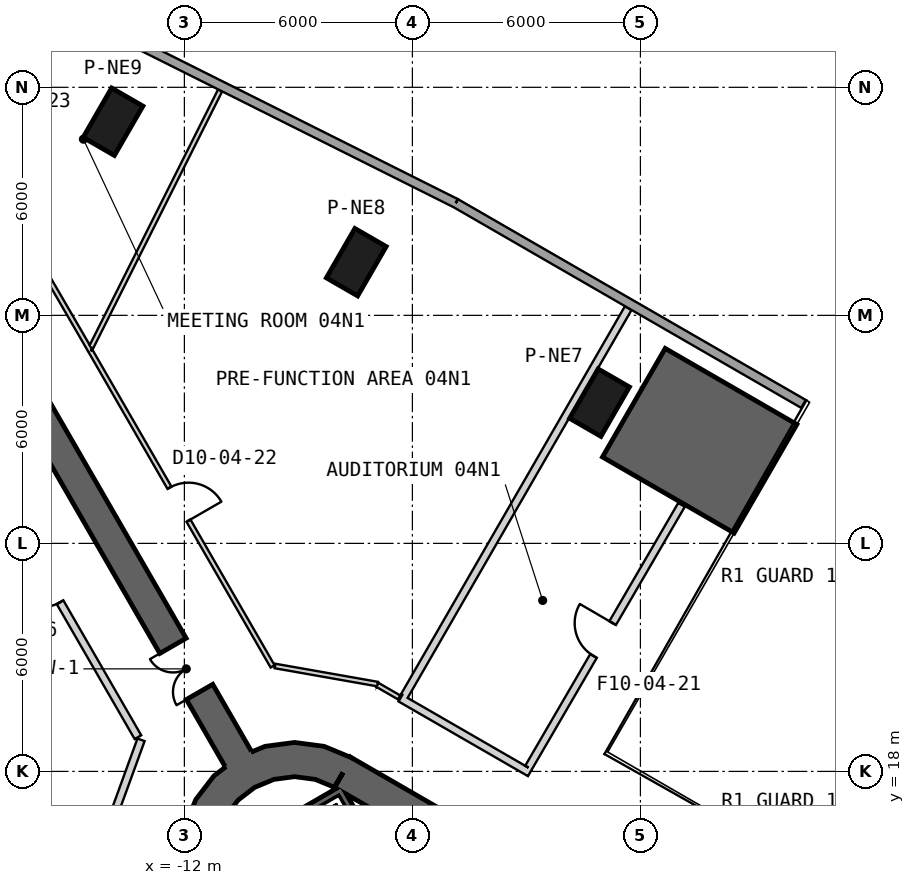
"""IFC4 building model, lengths in metres.
Left out: names, types, materials, properties, quantities, classifications, styles, units other than length and angle.
Written with IfcOpenShell. Run it as: python <this file> out.ifc"""

import sys

from ifc_helpers import new_model, si_unit, direction, frame, frame_2d, origin, origin_2d, place, context, subcontext, project, spatial, polyline, rectangle, outline, extrude, element, fill, save


model = new_model("IFC4")
c1 = context("Model", 3, precision=1e-05, world=origin(), true_north=direction((0.0, 1.0)))
c2 = subcontext(c1, "Body", "Model", "MODEL_VIEW")
j1 = project(units=[si_unit("LENGTHUNIT", "METRE"), si_unit("PLANEANGLEUNIT", "RADIAN")], contexts=[c1])
p1 = place(None, origin())
s1 = spatial("IfcSite", under=j1, at=p1, CompositionType="ELEMENT")
p2 = place(p1, origin())
s2 = spatial("IfcBuilding", under=s1, at=p2, CompositionType="ELEMENT")
p3 = place(p2, frame((0.0, 0.0, 27.5)))
s3 = spatial("IfcBuildingStorey", under=s2, at=p3, CompositionType="ELEMENT", Elevation=27.5)
for number, where, z_axis, x_axis in (
    (1, (-1.076, 27.703, 0.0), (0.0, 0.0, 1.0), (0.5, 0.866, 0.0)),
    (2, (-7.477, 31.398, 0.0), (0.0, 0.0, 1.0), (0.5, 0.866, 0.0)),
    (3, (-13.878, 35.094, 0.0), (0.0, 0.0, 1.0), (0.5, 0.866, 0.0)),
):
    element("IfcColumn", number, at=place(p3, frame(where, z_axis=z_axis, x_axis=x_axis)), inside=s3, PredefinedType="COLUMN", context=c2, shape_type="SweptSolid", body=[
        extrude(rectangle(XDim=1.5, YDim=0.95, at=origin_2d()), origin(), (0.0, 0.0, 1.0), 6.0),
    ])
p4 = place(p3, frame((19.475, 2.208, 0.0), z_axis=(0.0, 0.0, 1.0), x_axis=(-0.866028369851, 0.499994862586, 0.0)))
e4 = element("IfcWall", 4, at=p4, inside=s3, PredefinedType="SHEAR", context=c2, shape_type="SweptSolid", body=[
    extrude(rectangle(XDim=31.523, YDim=0.9, at=frame_2d((15.762, 0.0))), origin(), (0.0, 0.0, 1.0), 6.0),
])
p5 = place(p4, frame((7.062, 0.0, 0.0)))
e5 = element("IfcOpeningElement", 5, at=p5, cuts=e4, PredefinedType="OPENING", context=c2, shape_type="SweptSolid", body=[
    extrude(rectangle(XDim=1.2, YDim=2.4, at=frame_2d((0.6, 1.2))), frame((0.0, 0.46, 0.0), z_axis=(0.0, -1.0, 0.0), x_axis=(1.0, 0.0, 0.0)), (0.0, 0.0, 1.0), 0.92),
])
p6 = place(p4, frame((9.762, 0.0, 0.0)))
e6 = element("IfcOpeningElement", 6, at=p6, cuts=e4, PredefinedType="OPENING", context=c2, shape_type="SweptSolid", body=[
    extrude(rectangle(XDim=1.2, YDim=2.4, at=frame_2d((0.6, 1.2))), frame((0.0, 0.46, 0.0), z_axis=(0.0, -1.0, 0.0), x_axis=(1.0, 0.0, 0.0)), (0.0, 0.0, 1.0), 0.92),
])
p7 = place(p4, frame((12.462, 0.0, 0.0)))
e7 = element("IfcOpeningElement", 7, at=p7, cuts=e4, PredefinedType="OPENING", context=c2, shape_type="SweptSolid", body=[
    extrude(rectangle(XDim=1.2, YDim=2.4, at=frame_2d((0.6, 1.2))), frame((0.0, 0.46, 0.0), z_axis=(0.0, -1.0, 0.0), x_axis=(1.0, 0.0, 0.0)), (0.0, 0.0, 1.0), 0.92),
])
p8 = place(p4, frame((15.162, 0.0, 0.0)))
e8 = element("IfcOpeningElement", 8, at=p8, cuts=e4, PredefinedType="OPENING", context=c2, shape_type="SweptSolid", body=[
    extrude(rectangle(XDim=1.2, YDim=2.4, at=frame_2d((0.6, 1.2))), frame((0.0, 0.46, 0.0), z_axis=(0.0, -1.0, 0.0), x_axis=(1.0, 0.0, 0.0)), (0.0, 0.0, 1.0), 0.92),
])
p9 = place(p4, frame((17.862, 0.0, 0.0)))
e9 = element("IfcOpeningElement", 9, at=p9, cuts=e4, PredefinedType="OPENING", context=c2, shape_type="SweptSolid", body=[
    extrude(rectangle(XDim=1.2, YDim=2.4, at=frame_2d((0.6, 1.2))), frame((0.0, 0.46, 0.0), z_axis=(0.0, -1.0, 0.0), x_axis=(1.0, 0.0, 0.0)), (0.0, 0.0, 1.0), 0.92),
])
p10 = place(p4, frame((20.562, 0.0, 0.0)))
e10 = element("IfcOpeningElement", 10, at=p10, cuts=e4, PredefinedType="OPENING", context=c2, shape_type="SweptSolid", body=[
    extrude(rectangle(XDim=1.2, YDim=2.4, at=frame_2d((0.6, 1.2))), frame((0.0, 0.46, 0.0), z_axis=(0.0, -1.0, 0.0), x_axis=(1.0, 0.0, 0.0)), (0.0, 0.0, 1.0), 0.92),
])
p11 = place(p4, frame((23.262, 0.0, 0.0)))
e11 = element("IfcOpeningElement", 11, at=p11, cuts=e4, PredefinedType="OPENING", context=c2, shape_type="SweptSolid", body=[
    extrude(rectangle(XDim=1.2, YDim=2.4, at=frame_2d((0.6, 1.2))), frame((0.0, 0.46, 0.0), z_axis=(0.0, -1.0, 0.0), x_axis=(1.0, 0.0, 0.0)), (0.0, 0.0, 1.0), 0.92),
])
p12 = place(p4, frame((3.612, 0.0, 0.0)))
e12 = element("IfcOpeningElement", 12, at=p12, cuts=e4, PredefinedType="OPENING", context=c2, shape_type="SweptSolid", body=[
    extrude(rectangle(XDim=1.2, YDim=2.4, at=frame_2d((0.6, 1.2))), frame((0.0, 0.46, 0.0), z_axis=(0.0, -1.0, 0.0), x_axis=(1.0, 0.0, 0.0)), (0.0, 0.0, 1.0), 0.92),
])
p13 = place(p4, frame((26.712, 0.0, 0.0)))
e13 = element("IfcOpeningElement", 13, at=p13, cuts=e4, PredefinedType="OPENING", context=c2, shape_type="SweptSolid", body=[
    extrude(rectangle(XDim=1.2, YDim=2.4, at=frame_2d((0.6, 1.2))), frame((0.0, 0.46, 0.0), z_axis=(0.0, -1.0, 0.0), x_axis=(1.0, 0.0, 0.0)), (0.0, 0.0, 1.0), 0.92),
])
p14 = place(p3, origin())
e14 = element("IfcWall", 14, at=p14, inside=s3, PredefinedType="SHEAR", context=c2, shape_type="SweptSolid", body=[
    extrude(outline(polyline([(-7.6, 18.36), (-8.323, 18.659), (-9.1, 18.762), (-9.876, 18.659), (-10.6, 18.36), (-11.221, 17.883), (-11.698, 17.262), (-11.998, 16.538), (-12.1, 15.762), (-11.2, 15.762), (-11.128, 16.305), (-10.919, 16.812), (-10.585, 17.247), (-10.15, 17.58), (-9.644, 17.79), (-9.1, 17.862), (-8.556, 17.79), (-8.05, 17.58), (-7.6, 18.36)])), origin(), (0.0, 0.0, 1.0), 6.0),
])
p15 = place(p3, frame((-10.575, 18.316, 0.0), z_axis=(0.0, 0.0, 1.0), x_axis=(-0.499996575515, 0.866027380903, 0.0)))
e15 = element("IfcWall", 15, at=p15, inside=s3, PredefinedType="SHEAR", context=c2, shape_type="SweptSolid", body=[
    extrude(rectangle(XDim=13.954, YDim=0.8, at=frame_2d((6.977, 0.0))), origin(), (0.0, 0.0, 1.0), 6.0),
])
p16 = place(p15, frame((2.05, 0.0, 0.0)))
e16 = element("IfcOpeningElement", 16, at=p16, cuts=e15, PredefinedType="OPENING", context=c2, shape_type="SweptSolid", body=[
    extrude(rectangle(XDim=1.4, YDim=2.4, at=frame_2d((0.7, 1.2))), frame((0.0, 0.41, 0.0), z_axis=(0.0, -1.0, 0.0), x_axis=(1.0, 0.0, 0.0)), (0.0, 0.0, 1.0), 0.82),
])
p17 = place(p3, origin())
e17 = element("IfcWall", 17, at=p17, inside=s3, PredefinedType="SHEAR", context=c2, shape_type="SweptSolid", body=[
    extrude(outline(polyline([(4.116, 27.13), (0.652, 29.13), (-0.998, 26.272), (2.467, 24.272), (4.116, 27.13)])), origin(), (0.0, 0.0, 1.0), 6.0),
])
p18 = place(p3, frame((4.29, 27.67, 0.0), z_axis=(0.0, 0.0, 1.0), x_axis=(-0.866062075984, 0.499936476508, 0.0)))
e18 = element("IfcWall", 18, at=p18, inside=s3, PredefinedType="SOLIDWALL", context=c2, shape_type="SweptSolid", body=[
    extrude(rectangle(XDim=10.566, YDim=0.24, at=frame_2d((5.283, 0.0))), origin(), (0.0, 0.0, 1.0), 5.7),
])
p19 = place(p3, frame((-4.861, 32.952, 0.0), z_axis=(0.0, 0.0, 1.0), x_axis=(-0.894285628533, 0.447496608478, 0.0)))
e19 = element("IfcWall", 19, at=p19, inside=s3, PredefinedType="SOLIDWALL", context=c2, shape_type="SweptSolid", body=[
    extrude(rectangle(XDim=13.801, YDim=0.24, at=frame_2d((6.901, 0.0))), origin(), (0.0, 0.0, 1.0), 5.7),
])
p20 = place(p3, frame((-7.818, 17.541, -0.3), z_axis=(0.0, 0.0, 1.0), x_axis=(-0.866088799389, -0.499890179513, 0.0)))
e20 = element("IfcWall", 20, at=p20, inside=s3, PredefinedType="SHEAR", context=c2, shape_type="SweptSolid", body=[
    extrude(rectangle(XDim=1.89, YDim=0.2, at=frame_2d((0.945, 0.0))), origin(), (0.0, 0.0, 1.0), 6.0),
])
p21 = place(p3, frame((-7.854, 17.405, -0.3), z_axis=(0.0, 0.0, 1.0), x_axis=(0.499997992926, -0.866026562566, 0.0)))
e21 = element("IfcWall", 21, at=p21, inside=s3, PredefinedType="SHEAR", context=c2, shape_type="SweptSolid", body=[
    extrude(rectangle(XDim=7.9, YDim=0.2, at=frame_2d((3.95, 0.0))), origin(), (0.0, 0.0, 1.0), 6.0),
])
p22 = place(p3, frame((-13.14, 18.831, 0.0), z_axis=(0.0, 0.0, 1.0), x_axis=(-0.34195308529, -0.939717025205, 0.0)))
e22 = element("IfcWall", 22, at=p22, inside=s3, PredefinedType="PARTITIONING", context=c2, shape_type="SweptSolid", body=[
    extrude(rectangle(XDim=2.707, YDim=0.2, at=frame_2d((1.353, 0.0))), origin(), (0.0, 0.0, 1.0), 4.78),
])
p23 = place(p3, frame((-13.222, 18.9, 0.0), z_axis=(0.0, 0.0, 1.0), x_axis=(-0.499993569446, 0.866029116435, 0.0)))
e23 = element("IfcWall", 23, at=p23, inside=s3, PredefinedType="PARTITIONING", context=c2, shape_type="SweptSolid", body=[
    extrude(rectangle(XDim=9.51, YDim=0.2, at=frame_2d((4.755, 0.0))), origin(), (0.0, 0.0, 1.0), 5.7),
])
p24 = place(p23, frame((4.1, 0.0, 0.0)))
e24 = element("IfcOpeningElement", 24, at=p24, cuts=e23, PredefinedType="OPENING", context=c2, shape_type="SweptSolid", body=[
    extrude(rectangle(XDim=1.0, YDim=2.1, at=frame_2d((0.5, 1.05))), frame((0.0, 0.11, 0.0), z_axis=(0.0, -1.0, 0.0), x_axis=(1.0, 0.0, 0.0)), (0.0, 0.0, 1.0), 0.22),
])
p25 = place(p3, frame((-2.909, 17.962, 0.0), z_axis=(0.0, 0.0, 1.0), x_axis=(-0.866156637233, 0.499772628079, 0.0)))
e25 = element("IfcWall", 25, at=p25, inside=s3, PredefinedType="PARTITIONING", context=c2, shape_type="SweptSolid", body=[
    extrude(rectangle(XDim=3.931, YDim=0.2, at=frame_2d((1.966, 0.0))), origin(), (0.0, 0.0, 1.0), 4.88),
])
p26 = place(p3, frame((-2.945, 18.098, 0.0), z_axis=(0.0, 0.0, 1.0), x_axis=(0.503235430028, 0.864149351654, 0.0)))
e26 = element("IfcWall", 26, at=p26, inside=s3, PredefinedType="PARTITIONING", context=c2, shape_type="SweptSolid", body=[
    extrude(rectangle(XDim=8.002, YDim=0.2, at=frame_2d((4.001, 0.0))), origin(), (0.0, 0.0, 1.0), 5.17),
])
p27 = place(p26, frame((3.402, 0.0, 0.0)))
e27 = element("IfcOpeningElement", 27, at=p27, cuts=e26, PredefinedType="OPENING", context=c2, shape_type="SweptSolid", body=[
    extrude(rectangle(XDim=1.0, YDim=2.1, at=frame_2d((0.5, 1.05))), frame((0.0, 0.11, 0.0), z_axis=(0.0, -1.0, 0.0), x_axis=(1.0, 0.0, 0.0)), (0.0, 0.0, 1.0), 0.22),
])
p28 = place(p3, frame((-14.474, 29.069, 0.0), z_axis=(0.0, 0.0, 1.0), x_axis=(0.500007429105, -0.866021114546, 0.0)))
e28 = element("IfcWall", 28, at=p28, inside=s3, PredefinedType="PARTITIONING", context=c2, shape_type="SweptSolid", body=[
    extrude(rectangle(XDim=9.591, YDim=0.12, at=frame_2d((4.795, 0.0))), origin(), (0.0, 0.0, 1.0), 5.7),
])
p29 = place(p28, frame((4.164, 0.0, 0.0)))
e29 = element("IfcOpeningElement", 29, at=p29, cuts=e28, PredefinedType="OPENING", context=c2, shape_type="SweptSolid", body=[
    extrude(rectangle(XDim=1.0, YDim=2.1, at=frame_2d((0.5, 1.05))), frame((0.0, 0.07, 0.0), z_axis=(0.0, -1.0, 0.0), x_axis=(1.0, 0.0, 0.0)), (0.0, 0.0, 1.0), 0.14),
])
p30 = place(p3, frame((-6.915, 20.297, 0.0), z_axis=(0.0, 0.0, 1.0), x_axis=(-0.98477728301, 0.173820893068, 0.0)))
e30 = element("IfcWall", 30, at=p30, inside=s3, PredefinedType="PARTITIONING", context=c2, shape_type="SweptSolid", body=[
    extrude(rectangle(XDim=2.742, YDim=0.12, at=frame_2d((1.371, 0.0))), origin(), (0.0, 0.0, 1.0), 4.78),
])
p31 = place(p3, frame((-6.349, 19.947, 0.0), z_axis=(0.0, 0.0, 1.0), x_axis=(-0.865964461276, 0.500105540669, 0.0)))
e31 = element("IfcWall", 31, at=p31, inside=s3, PredefinedType="PARTITIONING", context=c2, shape_type="SweptSolid", body=[
    extrude(rectangle(XDim=0.662, YDim=0.12, at=frame_2d((0.331, 0.0))), origin(), (0.0, 0.0, 1.0), 5.7),
])
p32 = place(p3, frame((-20.466, 39.392, 0.0), z_axis=(0.0, 0.0, 1.0), x_axis=(0.50207038067, -0.86482676465, 0.0)))
e32 = element("IfcWall", 32, at=p32, inside=s3, PredefinedType="PARTITIONING", context=c2, shape_type="SweptSolid", body=[
    extrude(rectangle(XDim=11.936, YDim=0.12, at=frame_2d((5.968, 0.0))), origin(), (0.0, 0.0, 1.0), 5.7),
])
p33 = place(p32, frame((5.267, 0.0, 0.0)))
e33 = element("IfcOpeningElement", 33, at=p33, cuts=e32, PredefinedType="OPENING", context=c2, shape_type="SweptSolid", body=[
    extrude(rectangle(XDim=1.0, YDim=2.1, at=frame_2d((0.5, 1.05))), frame((0.0, 0.07, 0.0), z_axis=(0.0, -1.0, 0.0), x_axis=(1.0, 0.0, 0.0)), (0.0, 0.0, 1.0), 0.14),
])
p34 = place(p3, frame((-6.212, 19.983, 0.0), z_axis=(0.0, 0.0, 1.0), x_axis=(0.499938894435, 0.866060680225, 0.0)))
e34 = element("IfcWall", 34, at=p34, inside=s3, PredefinedType="PARTITIONING", context=c2, shape_type="SweptSolid", body=[
    extrude(rectangle(XDim=11.782, YDim=0.2, at=frame_2d((5.891, 0.0))), origin(), (0.0, 0.0, 1.0), 4.88),
])
p35 = place(p3, frame((-11.061, 35.915, 0.0), z_axis=(0.0, 0.0, 1.0), x_axis=(-0.448736604458, -0.893664064299, 0.0)))
e35 = element("IfcWall", 35, at=p35, inside=s3, PredefinedType="PARTITIONING", context=c2, shape_type="SweptSolid", body=[
    extrude(rectangle(XDim=7.563, YDim=0.12, at=frame_2d((3.781, 0.0))), origin(), (0.0, 0.0, 1.0), 4.78),
])
p36 = place(p24, origin())
e36 = element("IfcDoor", 36, at=p36, inside=s3, OperationType="SINGLE_SWING_RIGHT", PredefinedType="USERDEFINED", context=c2, shape_type="SweptSolid", body=[
    extrude(rectangle(XDim=1.0, YDim=2.1, at=frame_2d((0.5, 1.05))), frame((0.0, 0.025, 0.0), z_axis=(0.0, -1.0, 0.0), x_axis=(1.0, 0.0, 0.0)), (0.0, 0.0, 1.0), 0.05),
])
fill(e24, e36)
p37 = place(p27, origin())
e37 = element("IfcDoor", 37, at=p37, inside=s3, OperationType="SINGLE_SWING_RIGHT", PredefinedType="USERDEFINED", context=c2, shape_type="SweptSolid", body=[
    extrude(rectangle(XDim=1.0, YDim=2.1, at=frame_2d((0.5, 1.05))), frame((0.0, 0.025, 0.0), z_axis=(0.0, -1.0, 0.0), x_axis=(1.0, 0.0, 0.0)), (0.0, 0.0, 1.0), 0.05),
])
fill(e27, e37)
p38 = place(p29, origin())
e38 = element("IfcDoor", 38, at=p38, inside=s3, OperationType="SINGLE_SWING_RIGHT", PredefinedType="NOTDEFINED", context=c2, shape_type="SweptSolid", body=[
    extrude(rectangle(XDim=1.0, YDim=2.1, at=frame_2d((0.5, 1.05))), frame((0.0, 0.025, 0.0), z_axis=(0.0, -1.0, 0.0), x_axis=(1.0, 0.0, 0.0)), (0.0, 0.0, 1.0), 0.05),
])
fill(e29, e38)
p39 = place(p16, origin())
e39 = element("IfcDoor", 39, at=p39, inside=s3, OperationType="DOUBLE_DOOR_SINGLE_SWING", PredefinedType="NOTDEFINED", context=c2, shape_type="SweptSolid", body=[
    extrude(rectangle(XDim=1.4, YDim=2.4, at=frame_2d((0.7, 1.2))), frame((0.0, 0.025, 0.0), z_axis=(0.0, -1.0, 0.0), x_axis=(1.0, 0.0, 0.0)), (0.0, 0.0, 1.0), 0.05),
])
fill(e16, e39)
save(model, sys.argv[1])
